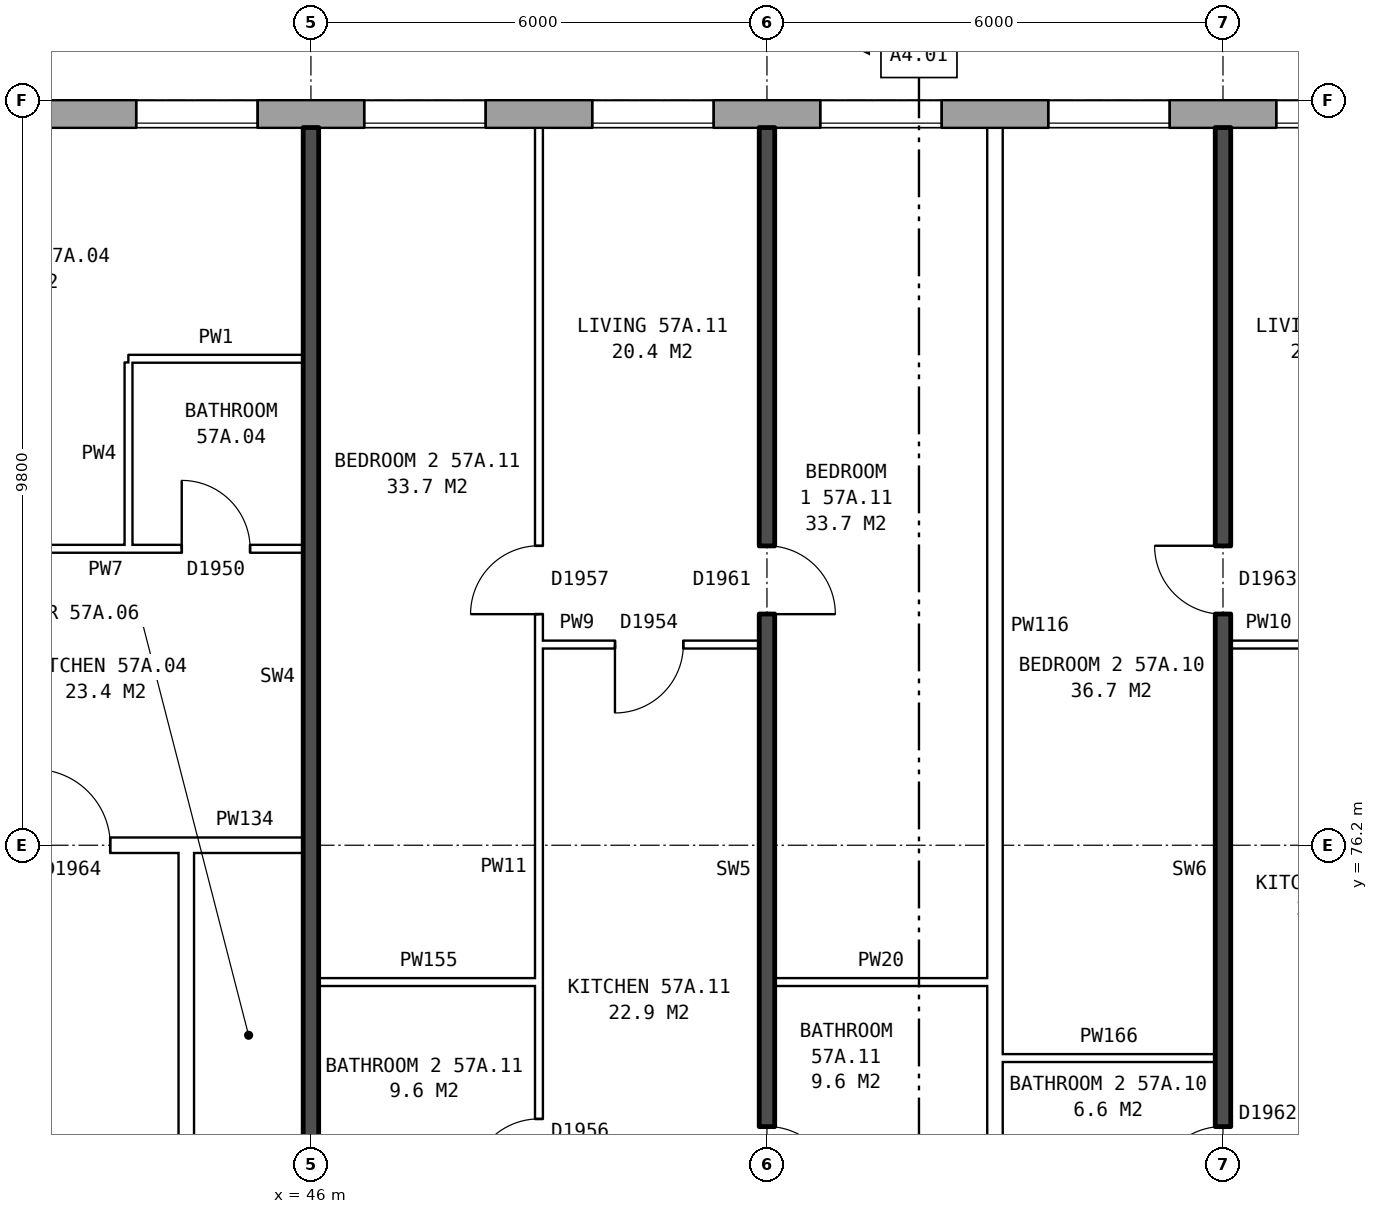
"""IFC4 building model, lengths in metres.
Left out: names, types, materials, properties, quantities, classifications, styles, units other than length and angle.
Written with IfcOpenShell. Run it as: python <this file> out.ifc"""

import sys

from ifc_helpers import new_model, si_unit, direction, frame, frame_2d, origin, place, context, subcontext, project, spatial, rectangle, extrude, element, fill, save


model = new_model("IFC4")
c1 = context("Model", 3, precision=1e-05, world=origin(), true_north=direction((0.0, 1.0)))
c2 = subcontext(c1, "Body", "Model", "MODEL_VIEW")
j1 = project(units=[si_unit("LENGTHUNIT", "METRE"), si_unit("PLANEANGLEUNIT", "RADIAN")], contexts=[c1])
p1 = place(None, origin())
s1 = spatial("IfcSite", under=j1, at=p1, CompositionType="ELEMENT")
p2 = place(p1, origin())
s2 = spatial("IfcBuilding", under=s1, at=p2, CompositionType="ELEMENT")
p3 = place(p2, frame((0.0, 0.0, 202.8)))
s3 = spatial("IfcBuildingStorey", under=s2, at=p3, CompositionType="ELEMENT", Elevation=202.8)
p4 = place(p3, frame((74.95, 85.82, 0.0), z_axis=(0.0, 0.0, 1.0), x_axis=(-1.0, 0.0, 0.0)))
e1 = element("IfcWall", 1, at=p4, inside=s3, PredefinedType="STANDARD", context=c2, shape_type="SweptSolid", body=[
    extrude(rectangle(XDim=39.875, YDim=0.36, at=frame_2d((19.938, 0.0))), origin(), (0.0, 0.0, 1.0), 2.85),
])
p5 = place(p4, frame((2.65, 0.0, 0.8)))
e2 = element("IfcOpeningElement", 2, at=p5, cuts=e1, PredefinedType="OPENING", context=c2, shape_type="SweptSolid", body=[
    extrude(rectangle(XDim=1.6, YDim=1.8, at=frame_2d((0.8, 0.9))), frame((0.0, 0.19, 0.0), z_axis=(0.0, -1.0, 0.0), x_axis=(1.0, 0.0, 0.0)), (0.0, 0.0, 1.0), 0.38),
])
p6 = place(p4, frame((5.65, 0.0, 0.8)))
e3 = element("IfcOpeningElement", 3, at=p6, cuts=e1, PredefinedType="OPENING", context=c2, shape_type="SweptSolid", body=[
    extrude(rectangle(XDim=1.6, YDim=1.8, at=frame_2d((0.8, 0.9))), frame((0.0, 0.19, 0.0), z_axis=(0.0, -1.0, 0.0), x_axis=(1.0, 0.0, 0.0)), (0.0, 0.0, 1.0), 0.38),
])
p7 = place(p4, frame((8.65, 0.0, 0.8)))
e4 = element("IfcOpeningElement", 4, at=p7, cuts=e1, PredefinedType="OPENING", context=c2, shape_type="SweptSolid", body=[
    extrude(rectangle(XDim=1.6, YDim=1.8, at=frame_2d((0.8, 0.9))), frame((0.0, 0.19, 0.0), z_axis=(0.0, -1.0, 0.0), x_axis=(1.0, 0.0, 0.0)), (0.0, 0.0, 1.0), 0.38),
])
p8 = place(p4, frame((11.65, 0.0, 0.8)))
e5 = element("IfcOpeningElement", 5, at=p8, cuts=e1, PredefinedType="OPENING", context=c2, shape_type="SweptSolid", body=[
    extrude(rectangle(XDim=1.6, YDim=1.8, at=frame_2d((0.8, 0.9))), frame((0.0, 0.19, 0.0), z_axis=(0.0, -1.0, 0.0), x_axis=(1.0, 0.0, 0.0)), (0.0, 0.0, 1.0), 0.38),
])
p9 = place(p4, frame((14.65, 0.0, 0.8)))
e6 = element("IfcOpeningElement", 6, at=p9, cuts=e1, PredefinedType="OPENING", context=c2, shape_type="SweptSolid", body=[
    extrude(rectangle(XDim=1.6, YDim=1.8, at=frame_2d((0.8, 0.9))), frame((0.0, 0.19, 0.0), z_axis=(0.0, -1.0, 0.0), x_axis=(1.0, 0.0, 0.0)), (0.0, 0.0, 1.0), 0.38),
])
p10 = place(p4, frame((17.65, 0.0, 0.8)))
e7 = element("IfcOpeningElement", 7, at=p10, cuts=e1, PredefinedType="OPENING", context=c2, shape_type="SweptSolid", body=[
    extrude(rectangle(XDim=1.6, YDim=1.8, at=frame_2d((0.8, 0.9))), frame((0.0, 0.19, 0.0), z_axis=(0.0, -1.0, 0.0), x_axis=(1.0, 0.0, 0.0)), (0.0, 0.0, 1.0), 0.38),
])
p11 = place(p4, frame((20.65, 0.0, 0.8)))
e8 = element("IfcOpeningElement", 8, at=p11, cuts=e1, PredefinedType="OPENING", context=c2, shape_type="SweptSolid", body=[
    extrude(rectangle(XDim=1.6, YDim=1.8, at=frame_2d((0.8, 0.9))), frame((0.0, 0.19, 0.0), z_axis=(0.0, -1.0, 0.0), x_axis=(1.0, 0.0, 0.0)), (0.0, 0.0, 1.0), 0.38),
])
p12 = place(p4, frame((23.65, 0.0, 0.8)))
e9 = element("IfcOpeningElement", 9, at=p12, cuts=e1, PredefinedType="OPENING", context=c2, shape_type="SweptSolid", body=[
    extrude(rectangle(XDim=1.6, YDim=1.8, at=frame_2d((0.8, 0.9))), frame((0.0, 0.19, 0.0), z_axis=(0.0, -1.0, 0.0), x_axis=(1.0, 0.0, 0.0)), (0.0, 0.0, 1.0), 0.38),
])
p13 = place(p4, frame((26.65, 0.0, 0.8)))
e10 = element("IfcOpeningElement", 10, at=p13, cuts=e1, PredefinedType="OPENING", context=c2, shape_type="SweptSolid", body=[
    extrude(rectangle(XDim=1.6, YDim=1.8, at=frame_2d((0.8, 0.9))), frame((0.0, 0.19, 0.0), z_axis=(0.0, -1.0, 0.0), x_axis=(1.0, 0.0, 0.0)), (0.0, 0.0, 1.0), 0.38),
])
p14 = place(p4, frame((29.65, 0.0, 0.8)))
e11 = element("IfcOpeningElement", 11, at=p14, cuts=e1, PredefinedType="OPENING", context=c2, shape_type="SweptSolid", body=[
    extrude(rectangle(XDim=1.6, YDim=1.8, at=frame_2d((0.8, 0.9))), frame((0.0, 0.19, 0.0), z_axis=(0.0, -1.0, 0.0), x_axis=(1.0, 0.0, 0.0)), (0.0, 0.0, 1.0), 0.38),
])
p15 = place(p4, frame((32.65, 0.0, 0.8)))
e12 = element("IfcOpeningElement", 12, at=p15, cuts=e1, PredefinedType="OPENING", context=c2, shape_type="SweptSolid", body=[
    extrude(rectangle(XDim=1.6, YDim=1.8, at=frame_2d((0.8, 0.9))), frame((0.0, 0.19, 0.0), z_axis=(0.0, -1.0, 0.0), x_axis=(1.0, 0.0, 0.0)), (0.0, 0.0, 1.0), 0.38),
])
p16 = place(p4, frame((35.65, 0.0, 0.8)))
e13 = element("IfcOpeningElement", 13, at=p16, cuts=e1, PredefinedType="OPENING", context=c2, shape_type="SweptSolid", body=[
    extrude(rectangle(XDim=1.6, YDim=1.8, at=frame_2d((0.8, 0.9))), frame((0.0, 0.19, 0.0), z_axis=(0.0, -1.0, 0.0), x_axis=(1.0, 0.0, 0.0)), (0.0, 0.0, 1.0), 0.38),
])
p17 = place(p3, frame((44.36, 63.9, 0.0), z_axis=(0.0, 0.0, 1.0), x_axis=(0.0, 1.0, 0.0)))
e14 = element("IfcWall", 14, at=p17, inside=s3, PredefinedType="PARTITIONING", context=c2, shape_type="SweptSolid", body=[
    extrude(rectangle(XDim=12.2, YDim=0.2, at=frame_2d((6.1, 0.0))), origin(), (0.0, 0.0, 1.0), 2.85),
])
p18 = place(p17, frame((5.1, 0.0, 0.0)))
e15 = element("IfcOpeningElement", 15, at=p18, cuts=e14, PredefinedType="OPENING", context=c2, shape_type="SweptSolid", body=[
    extrude(rectangle(XDim=2.0, YDim=2.1, at=frame_2d((1.0, 1.05))), frame((0.0, 0.11, 0.0), z_axis=(0.0, -1.0, 0.0), x_axis=(1.0, 0.0, 0.0)), (0.0, 0.0, 1.0), 0.22),
])
p19 = place(p3, frame((55.1, 73.4, 0.0), z_axis=(0.0, 0.0, 1.0), x_axis=(1.0, 0.0, 0.0)))
e16 = element("IfcWall", 16, at=p19, inside=s3, PredefinedType="PARTITIONING", context=c2, shape_type="SweptSolid", body=[
    extrude(rectangle(XDim=2.8, YDim=0.1, at=frame_2d((1.4, 0.0))), origin(), (0.0, 0.0, 1.0), 2.85),
])
p20 = place(p3, frame((46.1, 74.4, 0.0), z_axis=(0.0, 0.0, 1.0), x_axis=(1.0, 0.0, 0.0)))
e17 = element("IfcWall", 17, at=p20, inside=s3, PredefinedType="PARTITIONING", context=c2, shape_type="SweptSolid", body=[
    extrude(rectangle(XDim=2.9, YDim=0.1, at=frame_2d((1.45, 0.0))), origin(), (0.0, 0.0, 1.0), 2.85),
])
p21 = place(p3, frame((52.1, 74.4, 0.0), z_axis=(0.0, 0.0, 1.0), x_axis=(1.0, 0.0, 0.0)))
e18 = element("IfcWall", 18, at=p21, inside=s3, PredefinedType="PARTITIONING", context=c2, shape_type="SweptSolid", body=[
    extrude(rectangle(XDim=2.8, YDim=0.1, at=frame_2d((1.4, 0.0))), origin(), (0.0, 0.0, 1.0), 2.85),
])
p22 = place(p3, frame((41.36, 76.2, 0.0), z_axis=(0.0, 0.0, 1.0), x_axis=(1.0, 0.0, 0.0)))
e19 = element("IfcWall", 19, at=p22, inside=s3, PredefinedType="PARTITIONING", context=c2, shape_type="SweptSolid", body=[
    extrude(rectangle(XDim=3.0, YDim=0.2, at=frame_2d((1.5, 0.0))), origin(), (0.0, 0.0, 1.0), 2.85),
])
p23 = place(p22, frame((1.0, 0.0, 0.0)))
e20 = element("IfcOpeningElement", 20, at=p23, cuts=e19, PredefinedType="OPENING", context=c2, shape_type="SweptSolid", body=[
    extrude(rectangle(XDim=1.0, YDim=2.1, at=frame_2d((0.5, 1.05))), frame((0.0, 0.11, 0.0), z_axis=(0.0, -1.0, 0.0), x_axis=(1.0, 0.0, 0.0)), (0.0, 0.0, 1.0), 0.22),
])
p24 = place(p3, frame((44.36, 76.2, 0.0), z_axis=(0.0, 0.0, 1.0), x_axis=(1.0, 0.0, 0.0)))
e21 = element("IfcWall", 21, at=p24, inside=s3, PredefinedType="PARTITIONING", context=c2, shape_type="SweptSolid", body=[
    extrude(rectangle(XDim=1.54, YDim=0.2, at=frame_2d((0.77, 0.0))), origin(), (0.0, 0.0, 1.0), 2.85),
])
p25 = place(p3, frame((49.0, 78.84, 0.0), z_axis=(0.0, 0.0, 1.0), x_axis=(1.0, 0.0, 0.0)))
e22 = element("IfcWall", 22, at=p25, inside=s3, PredefinedType="PARTITIONING", context=c2, shape_type="SweptSolid", body=[
    extrude(rectangle(XDim=2.9, YDim=0.1, at=frame_2d((1.45, 0.0))), origin(), (0.0, 0.0, 1.0), 2.85),
])
p26 = place(p25, frame((1.0, 0.0, 0.0)))
e23 = element("IfcOpeningElement", 23, at=p26, cuts=e22, PredefinedType="OPENING", context=c2, shape_type="SweptSolid", body=[
    extrude(rectangle(XDim=0.9, YDim=2.1, at=frame_2d((0.45, 1.05))), frame((0.0, 0.06, 0.0), z_axis=(0.0, -1.0, 0.0), x_axis=(1.0, 0.0, 0.0)), (0.0, 0.0, 1.0), 0.12),
])
p27 = place(p3, frame((58.1, 78.84, 0.0), z_axis=(0.0, 0.0, 1.0), x_axis=(1.0, 0.0, 0.0)))
e24 = element("IfcWall", 24, at=p27, inside=s3, PredefinedType="PARTITIONING", context=c2, shape_type="SweptSolid", body=[
    extrude(rectangle(XDim=2.9, YDim=0.1, at=frame_2d((1.45, 0.0))), origin(), (0.0, 0.0, 1.0), 2.85),
])
p28 = place(p27, frame((1.0, 0.0, 0.0)))
e25 = element("IfcOpeningElement", 25, at=p28, cuts=e24, PredefinedType="OPENING", context=c2, shape_type="SweptSolid", body=[
    extrude(rectangle(XDim=0.9, YDim=2.1, at=frame_2d((0.45, 1.05))), frame((0.0, 0.06, 0.0), z_axis=(0.0, -1.0, 0.0), x_axis=(1.0, 0.0, 0.0)), (0.0, 0.0, 1.0), 0.12),
])
p29 = place(p3, frame((40.1, 80.1, 0.0), z_axis=(0.0, 0.0, 1.0), x_axis=(1.0, 0.0, 0.0)))
e26 = element("IfcWall", 26, at=p29, inside=s3, PredefinedType="PARTITIONING", context=c2, shape_type="SweptSolid", body=[
    extrude(rectangle(XDim=5.8, YDim=0.1, at=frame_2d((2.9, 0.0))), origin(), (0.0, 0.0, 1.0), 2.85),
])
p30 = place(p29, frame((1.3, 0.0, 0.0)))
e27 = element("IfcOpeningElement", 27, at=p30, cuts=e26, PredefinedType="OPENING", context=c2, shape_type="SweptSolid", body=[
    extrude(rectangle(XDim=0.9, YDim=2.1, at=frame_2d((0.45, 1.05))), frame((0.0, 0.06, 0.0), z_axis=(0.0, -1.0, 0.0), x_axis=(1.0, 0.0, 0.0)), (0.0, 0.0, 1.0), 0.12),
])
p31 = place(p29, frame((4.2, 0.0, 0.0)))
e28 = element("IfcOpeningElement", 28, at=p31, cuts=e26, PredefinedType="OPENING", context=c2, shape_type="SweptSolid", body=[
    extrude(rectangle(XDim=0.9, YDim=2.1, at=frame_2d((0.45, 1.05))), frame((0.0, 0.06, 0.0), z_axis=(0.0, -1.0, 0.0), x_axis=(1.0, 0.0, 0.0)), (0.0, 0.0, 1.0), 0.12),
])
p32 = place(p3, frame((43.6, 82.6, 0.0), z_axis=(0.0, 0.0, 1.0), x_axis=(1.0, 0.0, 0.0)))
e29 = element("IfcWall", 29, at=p32, inside=s3, PredefinedType="PARTITIONING", context=c2, shape_type="SweptSolid", body=[
    extrude(rectangle(XDim=2.3, YDim=0.1, at=frame_2d((1.15, 0.0))), origin(), (0.0, 0.0, 1.0), 2.85),
])
p33 = place(p3, frame((43.6, 80.15, 0.0), z_axis=(0.0, 0.0, 1.0), x_axis=(0.0, 1.0, 0.0)))
e30 = element("IfcWall", 30, at=p33, inside=s3, PredefinedType="PARTITIONING", context=c2, shape_type="SweptSolid", body=[
    extrude(rectangle(XDim=2.4, YDim=0.1, at=frame_2d((1.2, 0.0))), origin(), (0.0, 0.0, 1.0), 2.85),
])
p34 = place(p3, frame((46.0, 71.2, 0.0), z_axis=(0.0, 0.0, 1.0), x_axis=(0.0, 1.0, 0.0)))
e31 = element("IfcWall", 31, at=p34, inside=s3, PredefinedType="SOLIDWALL", context=c2, shape_type="SweptSolid", body=[
    extrude(rectangle(XDim=14.44, YDim=0.2, at=frame_2d((7.22, 0.0))), origin(), (0.0, 0.0, 1.0), 2.85),
])
p35 = place(p3, frame((49.0, 71.3, 0.0), z_axis=(0.0, 0.0, 1.0), x_axis=(0.0, 1.0, 0.0)))
e32 = element("IfcWall", 32, at=p35, inside=s3, PredefinedType="PARTITIONING", context=c2, shape_type="SweptSolid", body=[
    extrude(rectangle(XDim=14.34, YDim=0.1, at=frame_2d((7.17, 0.0))), origin(), (0.0, 0.0, 1.0), 2.85),
])
p36 = place(p35, frame((7.94, 0.0, 0.0)))
e33 = element("IfcOpeningElement", 33, at=p36, cuts=e32, PredefinedType="OPENING", context=c2, shape_type="SweptSolid", body=[
    extrude(rectangle(XDim=0.9, YDim=2.1, at=frame_2d((0.45, 1.05))), frame((0.0, 0.06, 0.0), z_axis=(0.0, -1.0, 0.0), x_axis=(1.0, 0.0, 0.0)), (0.0, 0.0, 1.0), 0.12),
])
p37 = place(p35, frame((0.4, 0.0, 0.0)))
e34 = element("IfcOpeningElement", 34, at=p37, cuts=e32, PredefinedType="OPENING", context=c2, shape_type="SweptSolid", body=[
    extrude(rectangle(XDim=0.9, YDim=2.1, at=frame_2d((0.45, 1.05))), frame((0.0, 0.06, 0.0), z_axis=(0.0, -1.0, 0.0), x_axis=(1.0, 0.0, 0.0)), (0.0, 0.0, 1.0), 0.12),
])
p38 = place(p3, frame((52.0, 71.2, 0.0), z_axis=(0.0, 0.0, 1.0), x_axis=(0.0, 1.0, 0.0)))
e35 = element("IfcWall", 35, at=p38, inside=s3, PredefinedType="SOLIDWALL", context=c2, shape_type="SweptSolid", body=[
    extrude(rectangle(XDim=14.44, YDim=0.2, at=frame_2d((7.22, 0.0))), origin(), (0.0, 0.0, 1.0), 2.85),
])
p39 = place(p38, frame((8.04, 0.0, 0.0)))
e36 = element("IfcOpeningElement", 36, at=p39, cuts=e35, PredefinedType="OPENING", context=c2, shape_type="SweptSolid", body=[
    extrude(rectangle(XDim=0.9, YDim=2.1, at=frame_2d((0.45, 1.05))), frame((0.0, 0.11, 0.0), z_axis=(0.0, -1.0, 0.0), x_axis=(1.0, 0.0, 0.0)), (0.0, 0.0, 1.0), 0.22),
])
p40 = place(p38, frame((0.4, 0.0, 0.0)))
e37 = element("IfcOpeningElement", 37, at=p40, cuts=e35, PredefinedType="OPENING", context=c2, shape_type="SweptSolid", body=[
    extrude(rectangle(XDim=0.9, YDim=2.1, at=frame_2d((0.45, 1.05))), frame((0.0, 0.11, 0.0), z_axis=(0.0, -1.0, 0.0), x_axis=(1.0, 0.0, 0.0)), (0.0, 0.0, 1.0), 0.22),
])
p41 = place(p3, frame((55.0, 71.3, 0.0), z_axis=(0.0, 0.0, 1.0), x_axis=(0.0, 1.0, 0.0)))
e38 = element("IfcWall", 38, at=p41, inside=s3, PredefinedType="PARTITIONING", context=c2, shape_type="SweptSolid", body=[
    extrude(rectangle(XDim=14.34, YDim=0.2, at=frame_2d((7.17, 0.0))), origin(), (0.0, 0.0, 1.0), 2.85),
])
p42 = place(p3, frame((58.0, 71.2, 0.0), z_axis=(0.0, 0.0, 1.0), x_axis=(0.0, 1.0, 0.0)))
e39 = element("IfcWall", 39, at=p42, inside=s3, PredefinedType="SOLIDWALL", context=c2, shape_type="SweptSolid", body=[
    extrude(rectangle(XDim=14.44, YDim=0.2, at=frame_2d((7.22, 0.0))), origin(), (0.0, 0.0, 1.0), 2.85),
])
p43 = place(p42, frame((8.04, 0.0, 0.0)))
e40 = element("IfcOpeningElement", 40, at=p43, cuts=e39, PredefinedType="OPENING", context=c2, shape_type="SweptSolid", body=[
    extrude(rectangle(XDim=0.9, YDim=2.1, at=frame_2d((0.45, 1.05))), frame((0.0, 0.11, 0.0), z_axis=(0.0, -1.0, 0.0), x_axis=(1.0, 0.0, 0.0)), (0.0, 0.0, 1.0), 0.22),
])
p44 = place(p42, frame((0.4, 0.0, 0.0)))
e41 = element("IfcOpeningElement", 41, at=p44, cuts=e39, PredefinedType="OPENING", context=c2, shape_type="SweptSolid", body=[
    extrude(rectangle(XDim=0.9, YDim=2.1, at=frame_2d((0.45, 1.05))), frame((0.0, 0.11, 0.0), z_axis=(0.0, -1.0, 0.0), x_axis=(1.0, 0.0, 0.0)), (0.0, 0.0, 1.0), 0.22),
])
p45 = place(p9, origin())
e42 = element("IfcWindow", 42, at=p45, inside=s3, PartitioningType="SINGLE_PANEL", PredefinedType="WINDOW", context=c2, shape_type="SweptSolid", body=[
    extrude(rectangle(XDim=1.6, YDim=1.8, at=frame_2d((0.8, 0.9))), frame((0.0, 0.15, 0.0), z_axis=(0.0, -1.0, 0.0), x_axis=(1.0, 0.0, 0.0)), (0.0, 0.0, 1.0), 0.06),
])
fill(e6, e42)
p46 = place(p10, origin())
e43 = element("IfcWindow", 43, at=p46, inside=s3, PartitioningType="SINGLE_PANEL", PredefinedType="WINDOW", context=c2, shape_type="SweptSolid", body=[
    extrude(rectangle(XDim=1.6, YDim=1.8, at=frame_2d((0.8, 0.9))), frame((0.0, 0.15, 0.0), z_axis=(0.0, -1.0, 0.0), x_axis=(1.0, 0.0, 0.0)), (0.0, 0.0, 1.0), 0.06),
])
fill(e7, e43)
p47 = place(p11, origin())
e44 = element("IfcWindow", 44, at=p47, inside=s3, PartitioningType="SINGLE_PANEL", PredefinedType="WINDOW", context=c2, shape_type="SweptSolid", body=[
    extrude(rectangle(XDim=1.6, YDim=1.8, at=frame_2d((0.8, 0.9))), frame((0.0, 0.15, 0.0), z_axis=(0.0, -1.0, 0.0), x_axis=(1.0, 0.0, 0.0)), (0.0, 0.0, 1.0), 0.06),
])
fill(e8, e44)
p48 = place(p12, origin())
e45 = element("IfcWindow", 45, at=p48, inside=s3, PartitioningType="SINGLE_PANEL", PredefinedType="WINDOW", context=c2, shape_type="SweptSolid", body=[
    extrude(rectangle(XDim=1.6, YDim=1.8, at=frame_2d((0.8, 0.9))), frame((0.0, 0.15, 0.0), z_axis=(0.0, -1.0, 0.0), x_axis=(1.0, 0.0, 0.0)), (0.0, 0.0, 1.0), 0.06),
])
fill(e9, e45)
p49 = place(p13, origin())
e46 = element("IfcWindow", 46, at=p49, inside=s3, PartitioningType="SINGLE_PANEL", PredefinedType="WINDOW", context=c2, shape_type="SweptSolid", body=[
    extrude(rectangle(XDim=1.6, YDim=1.8, at=frame_2d((0.8, 0.9))), frame((0.0, 0.15, 0.0), z_axis=(0.0, -1.0, 0.0), x_axis=(1.0, 0.0, 0.0)), (0.0, 0.0, 1.0), 0.06),
])
fill(e10, e46)
p50 = place(p14, origin())
e47 = element("IfcWindow", 47, at=p50, inside=s3, PartitioningType="SINGLE_PANEL", PredefinedType="WINDOW", context=c2, shape_type="SweptSolid", body=[
    extrude(rectangle(XDim=1.6, YDim=1.8, at=frame_2d((0.8, 0.9))), frame((0.0, 0.15, 0.0), z_axis=(0.0, -1.0, 0.0), x_axis=(1.0, 0.0, 0.0)), (0.0, 0.0, 1.0), 0.06),
])
fill(e11, e47)
p51 = place(p23, origin())
e48 = element("IfcDoor", 48, at=p51, inside=s3, OperationType="SINGLE_SWING_LEFT", PredefinedType="DOOR", context=c2, shape_type="SweptSolid", body=[
    extrude(rectangle(XDim=1.0, YDim=2.1, at=frame_2d((0.5, 1.05))), frame((0.0, 0.025, 0.0), z_axis=(0.0, -1.0, 0.0), x_axis=(1.0, 0.0, 0.0)), (0.0, 0.0, 1.0), 0.05),
])
fill(e20, e48)
p52 = place(p31, origin())
e49 = element("IfcDoor", 49, at=p52, inside=s3, OperationType="SINGLE_SWING_LEFT", PredefinedType="DOOR", context=c2, shape_type="SweptSolid", body=[
    extrude(rectangle(XDim=0.9, YDim=2.1, at=frame_2d((0.45, 1.05))), frame((0.0, 0.025, 0.0), z_axis=(0.0, -1.0, 0.0), x_axis=(1.0, 0.0, 0.0)), (0.0, 0.0, 1.0), 0.05),
])
fill(e28, e49)
p53 = place(p43, origin())
e50 = element("IfcDoor", 50, at=p53, inside=s3, OperationType="SINGLE_SWING_RIGHT", PredefinedType="DOOR", context=c2, shape_type="SweptSolid", body=[
    extrude(rectangle(XDim=0.9, YDim=2.1, at=frame_2d((0.45, 1.05))), frame((0.0, 0.025, 0.0), z_axis=(0.0, -1.0, 0.0), x_axis=(1.0, 0.0, 0.0)), (0.0, 0.0, 1.0), 0.05),
])
fill(e40, e50)
p54 = place(p44, origin())
e51 = element("IfcDoor", 51, at=p54, inside=s3, OperationType="SINGLE_SWING_LEFT", PredefinedType="DOOR", context=c2, shape_type="SweptSolid", body=[
    extrude(rectangle(XDim=0.9, YDim=2.1, at=frame_2d((0.45, 1.05))), frame((0.0, 0.025, 0.0), z_axis=(0.0, -1.0, 0.0), x_axis=(1.0, 0.0, 0.0)), (0.0, 0.0, 1.0), 0.05),
])
fill(e41, e51)
p55 = place(p39, frame((0.9, 0.0, 0.0), z_axis=(0.0, 0.0, 1.0), x_axis=(-1.0, 0.0, 0.0)))
e52 = element("IfcDoor", 52, at=p55, inside=s3, OperationType="SINGLE_SWING_RIGHT", PredefinedType="DOOR", context=c2, shape_type="SweptSolid", body=[
    extrude(rectangle(XDim=0.9, YDim=2.1, at=frame_2d((0.45, 1.05))), frame((0.0, 0.025, 0.0), z_axis=(0.0, -1.0, 0.0), x_axis=(1.0, 0.0, 0.0)), (0.0, 0.0, 1.0), 0.05),
])
fill(e36, e52)
p56 = place(p36, origin())
e53 = element("IfcDoor", 53, at=p56, inside=s3, OperationType="SINGLE_SWING_LEFT", PredefinedType="DOOR", context=c2, shape_type="SweptSolid", body=[
    extrude(rectangle(XDim=0.9, YDim=2.1, at=frame_2d((0.45, 1.05))), frame((0.0, 0.025, 0.0), z_axis=(0.0, -1.0, 0.0), x_axis=(1.0, 0.0, 0.0)), (0.0, 0.0, 1.0), 0.05),
])
fill(e33, e53)
p57 = place(p26, frame((0.9, 0.0, 0.0), z_axis=(0.0, 0.0, 1.0), x_axis=(-1.0, 0.0, 0.0)))
e54 = element("IfcDoor", 54, at=p57, inside=s3, OperationType="SINGLE_SWING_RIGHT", PredefinedType="DOOR", context=c2, shape_type="SweptSolid", body=[
    extrude(rectangle(XDim=0.9, YDim=2.1, at=frame_2d((0.45, 1.05))), frame((0.0, 0.025, 0.0), z_axis=(0.0, -1.0, 0.0), x_axis=(1.0, 0.0, 0.0)), (0.0, 0.0, 1.0), 0.05),
])
fill(e23, e54)
p58 = place(p40, frame((0.9, 0.0, 0.0), z_axis=(0.0, 0.0, 1.0), x_axis=(-1.0, 0.0, 0.0)))
e55 = element("IfcDoor", 55, at=p58, inside=s3, OperationType="SINGLE_SWING_RIGHT", PredefinedType="DOOR", context=c2, shape_type="SweptSolid", body=[
    extrude(rectangle(XDim=0.9, YDim=2.1, at=frame_2d((0.45, 1.05))), frame((0.0, 0.025, 0.0), z_axis=(0.0, -1.0, 0.0), x_axis=(1.0, 0.0, 0.0)), (0.0, 0.0, 1.0), 0.05),
])
fill(e37, e55)
p59 = place(p37, origin())
e56 = element("IfcDoor", 56, at=p59, inside=s3, OperationType="SINGLE_SWING_LEFT", PredefinedType="DOOR", context=c2, shape_type="SweptSolid", body=[
    extrude(rectangle(XDim=0.9, YDim=2.1, at=frame_2d((0.45, 1.05))), frame((0.0, 0.025, 0.0), z_axis=(0.0, -1.0, 0.0), x_axis=(1.0, 0.0, 0.0)), (0.0, 0.0, 1.0), 0.05),
])
fill(e34, e56)
save(model, sys.argv[1])
